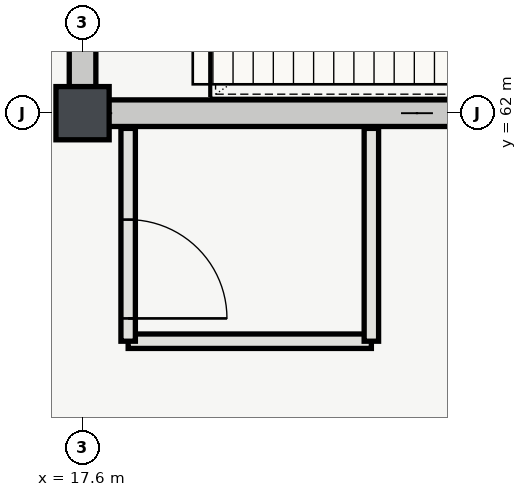
"""IFC4 building model, lengths in metres.
Left out: names, types, materials, properties, quantities, classifications, styles, units other than length and angle.
Written with IfcOpenShell. Run it as: python <this file> out.ifc"""

import sys

from ifc_helpers import new_model, si_unit, direction, frame, frame_2d, origin, origin_2d, place, context, subcontext, project, spatial, rectangle, extrude, element, fill, save


model = new_model("IFC4")
c1 = context("Model", 3, precision=1e-05, world=origin(), true_north=direction((0.0, 1.0)))
c2 = subcontext(c1, "Body", "Model", "MODEL_VIEW")
j1 = project(units=[si_unit("LENGTHUNIT", "METRE"), si_unit("PLANEANGLEUNIT", "RADIAN")], contexts=[c1])
p1 = place(None, origin())
s1 = spatial("IfcSite", under=j1, at=p1, CompositionType="ELEMENT")
p2 = place(p1, origin())
s2 = spatial("IfcBuilding", under=s1, at=p2, CompositionType="ELEMENT")
p3 = place(p2, frame((0.0, 0.0, 5.4)))
s3 = spatial("IfcBuildingStorey", under=s2, at=p3, CompositionType="ELEMENT", Elevation=5.4)
p4 = place(p3, frame((17.6, 62.0, 0.0), z_axis=(0.0, 0.0, 1.0), x_axis=(1.0, 0.0, 0.0)))
e1 = element("IfcColumn", 1, at=p4, inside=s3, PredefinedType="COLUMN", context=c2, shape_type="SweptSolid", body=[
    extrude(rectangle(XDim=0.7, YDim=0.7, at=origin_2d()), origin(), (0.0, 0.0, 1.0), 5.4),
])
p5 = place(p3, frame((17.425, 62.0, 0.0), z_axis=(0.0, 0.0, 1.0), x_axis=(1.0, 0.0, 0.0)))
e2 = element("IfcWall", 2, at=p5, inside=s3, PredefinedType="SHEAR", context=c2, shape_type="SweptSolid", body=[
    extrude(rectangle(XDim=9.15, YDim=0.35, at=frame_2d((4.575, 0.0))), origin(), (0.0, 0.0, 1.0), 5.12),
])
p6 = place(p3, frame((17.6, 62.175, 0.0), z_axis=(0.0, 0.0, 1.0), x_axis=(0.0, 1.0, 0.0)))
e3 = element("IfcWall", 3, at=p6, inside=s3, PredefinedType="SHEAR", context=c2, shape_type="SweptSolid", body=[
    extrude(rectangle(XDim=7.65, YDim=0.35, at=frame_2d((3.825, 0.0))), origin(), (0.0, 0.0, 1.0), 5.12),
])
p7 = place(p6, frame((1.65, 0.0, 0.0)))
e4 = element("IfcOpeningElement", 4, at=p7, cuts=e3, PredefinedType="OPENING", context=c2, shape_type="SweptSolid", body=[
    extrude(rectangle(XDim=1.35, YDim=2.2, at=frame_2d((0.675, 1.1))), frame((0.0, 0.185, 0.0), z_axis=(0.0, -1.0, 0.0), x_axis=(1.0, 0.0, 0.0)), (0.0, 0.0, 1.0), 0.37),
])
p8 = place(p6, frame((5.675, 0.0, 0.0)))
e5 = element("IfcOpeningElement", 5, at=p8, cuts=e3, PredefinedType="OPENING", context=c2, shape_type="SweptSolid", body=[
    extrude(rectangle(XDim=1.0, YDim=2.15, at=frame_2d((0.5, 1.075))), frame((0.0, 0.185, 0.0), z_axis=(0.0, -1.0, 0.0), x_axis=(1.0, 0.0, 0.0)), (0.0, 0.0, 1.0), 0.37),
])
p9 = place(p3, frame((18.2, 59.0, 0.0), z_axis=(0.0, 0.0, 1.0), x_axis=(1.0, 0.0, 0.0)))
e6 = element("IfcWall", 6, at=p9, inside=s3, PredefinedType="PARTITIONING", context=c2, shape_type="SweptSolid", body=[
    extrude(rectangle(XDim=3.2, YDim=0.19, at=frame_2d((1.6, 0.0))), origin(), (0.0, 0.0, 1.0), 5.12),
])
p10 = place(p3, frame((18.2, 61.8, 0.0), z_axis=(0.0, 0.0, 1.0), x_axis=(0.0, -1.0, 0.0)))
e7 = element("IfcWall", 7, at=p10, inside=s3, PredefinedType="PARTITIONING", context=c2, shape_type="SweptSolid", body=[
    extrude(rectangle(XDim=2.8, YDim=0.19, at=frame_2d((1.4, 0.0))), origin(), (0.0, 0.0, 1.0), 5.12),
])
p11 = place(p10, frame((1.2, 0.0, 0.0)))
e8 = element("IfcOpeningElement", 8, at=p11, cuts=e7, PredefinedType="OPENING", context=c2, shape_type="SweptSolid", body=[
    extrude(rectangle(XDim=1.3, YDim=2.2, at=frame_2d((0.65, 1.1))), frame((0.0, 0.105, 0.0), z_axis=(0.0, -1.0, 0.0), x_axis=(1.0, 0.0, 0.0)), (0.0, 0.0, 1.0), 0.21),
])
p12 = place(p3, frame((21.4, 59.0, 0.0), z_axis=(0.0, 0.0, 1.0), x_axis=(0.0, 1.0, 0.0)))
e9 = element("IfcWall", 9, at=p12, inside=s3, PredefinedType="PARTITIONING", context=c2, shape_type="SweptSolid", body=[
    extrude(rectangle(XDim=2.8, YDim=0.19, at=frame_2d((1.4, 0.0))), origin(), (0.0, 0.0, 1.0), 5.12),
])
p13 = place(p11, origin())
e10 = element("IfcDoor", 10, at=p13, inside=s3, OperationType="SINGLE_SWING_RIGHT", PredefinedType="DOOR", context=c2, shape_type="SweptSolid", body=[
    extrude(rectangle(XDim=1.3, YDim=2.2, at=frame_2d((0.65, 1.1))), frame((0.0, 0.025, 0.0), z_axis=(0.0, -1.0, 0.0), x_axis=(1.0, 0.0, 0.0)), (0.0, 0.0, 1.0), 0.05),
])
fill(e8, e10)
save(model, sys.argv[1])
